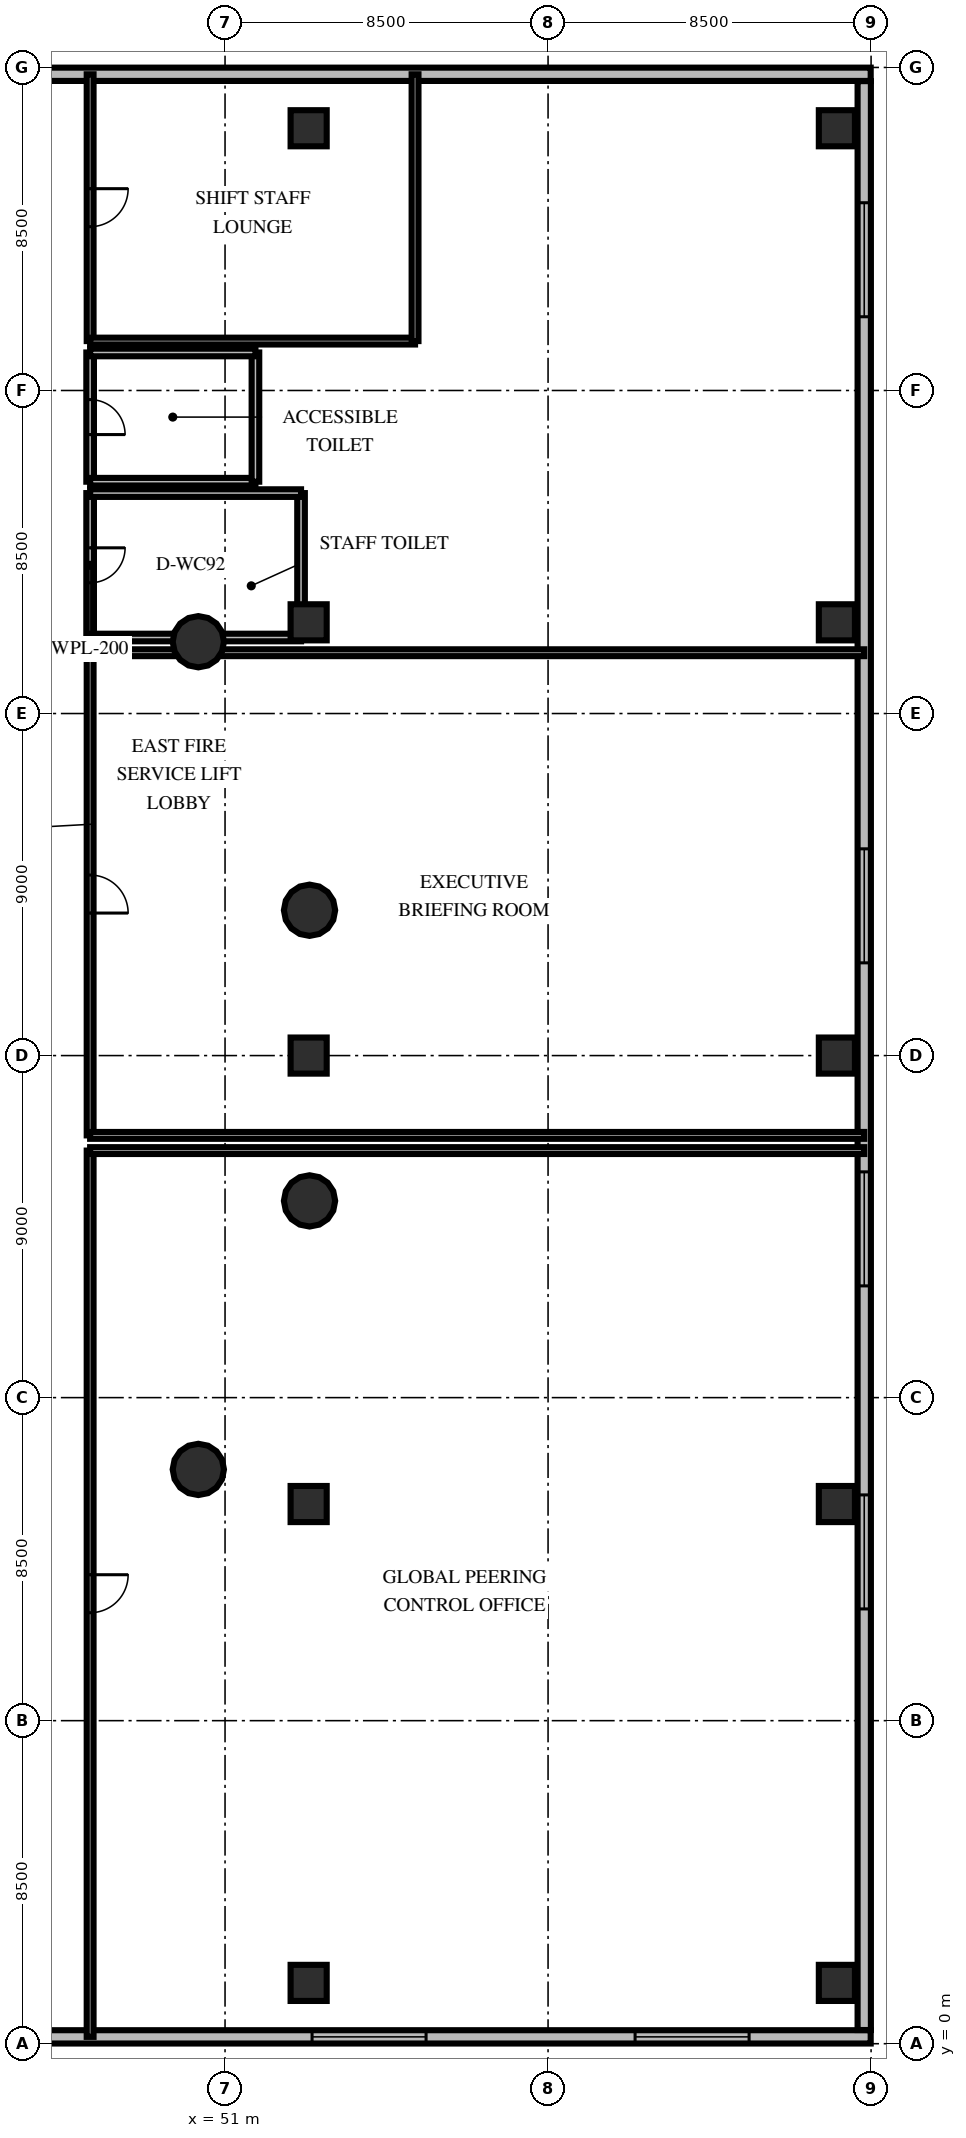
"""IFC4 building model, lengths in metres.
Left out: names, types, materials, properties, quantities, classifications, styles, units other than length and angle.
Written with IfcOpenShell. Run it as: python <this file> out.ifc"""

import sys

from ifc_helpers import new_model, si_unit, direction, frame, frame_2d, origin, origin_2d, place, context, subcontext, project, spatial, rectangle, circle, extrude, element, fill, save


model = new_model("IFC4")
c1 = context("Model", 3, precision=1e-05, world=origin(), true_north=direction((0.0, 1.0)))
c2 = subcontext(c1, "Body", "Model", "MODEL_VIEW")
j1 = project(units=[si_unit("LENGTHUNIT", "METRE"), si_unit("PLANEANGLEUNIT", "RADIAN")], contexts=[c1])
p1 = place(None, origin())
s1 = spatial("IfcSite", under=j1, at=p1, CompositionType="ELEMENT")
p2 = place(p1, origin())
s2 = spatial("IfcBuilding", under=s1, at=p2, CompositionType="ELEMENT")
p3 = place(p2, frame((0.0, 0.0, 10.2)))
s3 = spatial("IfcBuildingStorey", under=s2, at=p3, CompositionType="ELEMENT", Elevation=10.2)
for number, where, z_axis, x_axis in (
    (1, (53.2, 1.6, 0.0), (0.0, 0.0, 1.0), (1.0, 0.0, 0.0)),
    (2, (53.2, 14.2, 0.0), (0.0, 0.0, 1.0), (1.0, 0.0, 0.0)),
    (3, (53.2, 26.0, 0.0), (0.0, 0.0, 1.0), (1.0, 0.0, 0.0)),
    (4, (53.2, 37.4, 0.0), (0.0, 0.0, 1.0), (1.0, 0.0, 0.0)),
    (5, (53.2, 50.4, 0.0), (0.0, 0.0, 1.0), (1.0, 0.0, 0.0)),
    (6, (67.1, 1.6, 0.0), (0.0, 0.0, 1.0), (1.0, 0.0, 0.0)),
    (7, (67.1, 14.2, 0.0), (0.0, 0.0, 1.0), (1.0, 0.0, 0.0)),
    (8, (67.1, 26.0, 0.0), (0.0, 0.0, 1.0), (1.0, 0.0, 0.0)),
    (9, (67.1, 37.4, 0.0), (0.0, 0.0, 1.0), (1.0, 0.0, 0.0)),
    (10, (67.1, 50.4, 0.0), (0.0, 0.0, 1.0), (1.0, 0.0, 0.0)),
):
    element("IfcColumn", number, at=place(p3, frame(where, z_axis=z_axis, x_axis=x_axis)), inside=s3, PredefinedType="COLUMN", context=c2, shape_type="SweptSolid", body=[
        extrude(rectangle(XDim=0.95, YDim=0.95, at=origin_2d()), origin(), (0.0, 0.0, 1.0), 5.4),
    ])
for number, where, z_axis, x_axis in (
    (11, (53.223, 29.824, 0.0), (0.0, 0.0, 1.0), (1.0, 0.0, 0.0)),
    (12, (50.297, 36.889, 0.0), (0.0, 0.0, 1.0), (1.0, 0.0, 0.0)),
    (13, (50.297, 15.111, 0.0), (0.0, 0.0, 1.0), (1.0, 0.0, 0.0)),
    (14, (53.223, 22.176, 0.0), (0.0, 0.0, 1.0), (1.0, 0.0, 0.0)),
):
    element("IfcColumn", number, at=place(p3, frame(where, z_axis=z_axis, x_axis=x_axis)), inside=s3, PredefinedType="COLUMN", context=c2, shape_type="SweptSolid", body=[
        extrude(circle(Radius=0.675, at=origin_2d()), origin(), (0.0, 0.0, 1.0), 5.4),
    ])
p4 = place(p3, frame((67.99, 0.18, 0.0), z_axis=(0.0, 0.0, 1.0), x_axis=(-1.0, 0.0, 0.0)))
e15 = element("IfcWall", 15, at=p4, inside=s3, PredefinedType="SOLIDWALL", context=c2, shape_type="SweptSolid", body=[
    extrude(rectangle(XDim=25.37, YDim=0.35, at=frame_2d((12.685, 0.0))), origin(), (0.0, 0.0, 1.0), 4.36),
])
p5 = place(p4, frame((3.2, 0.0, 0.85)))
e16 = element("IfcOpeningElement", 16, at=p5, cuts=e15, PredefinedType="OPENING", context=c2, shape_type="SweptSolid", body=[
    extrude(rectangle(XDim=3.0, YDim=2.4, at=frame_2d((1.5, 1.2))), frame((0.0, 0.185, 0.0), z_axis=(0.0, -1.0, 0.0), x_axis=(1.0, 0.0, 0.0)), (0.0, 0.0, 1.0), 0.37),
])
p6 = place(p4, frame((11.7, 0.0, 0.85)))
e17 = element("IfcOpeningElement", 17, at=p6, cuts=e15, PredefinedType="OPENING", context=c2, shape_type="SweptSolid", body=[
    extrude(rectangle(XDim=3.0, YDim=2.4, at=frame_2d((1.5, 1.2))), frame((0.0, 0.185, 0.0), z_axis=(0.0, -1.0, 0.0), x_axis=(1.0, 0.0, 0.0)), (0.0, 0.0, 1.0), 0.37),
])
p7 = place(p3, frame((67.82, 51.64, 0.0), z_axis=(0.0, 0.0, 1.0), x_axis=(0.0, -1.0, 0.0)))
e18 = element("IfcWall", 18, at=p7, inside=s3, PredefinedType="SOLIDWALL", context=c2, shape_type="SweptSolid", body=[
    extrude(rectangle(XDim=51.28, YDim=0.35, at=frame_2d((25.64, 0.0))), origin(), (0.0, 0.0, 1.0), 4.36),
])
p8 = place(p7, frame((3.2, 0.0, 0.85)))
e19 = element("IfcOpeningElement", 19, at=p8, cuts=e18, PredefinedType="OPENING", context=c2, shape_type="SweptSolid", body=[
    extrude(rectangle(XDim=3.0, YDim=2.4, at=frame_2d((1.5, 1.2))), frame((0.0, 0.185, 0.0), z_axis=(0.0, -1.0, 0.0), x_axis=(1.0, 0.0, 0.0)), (0.0, 0.0, 1.0), 0.37),
])
p9 = place(p7, frame((20.2, 0.0, 0.85)))
e20 = element("IfcOpeningElement", 20, at=p9, cuts=e18, PredefinedType="OPENING", context=c2, shape_type="SweptSolid", body=[
    extrude(rectangle(XDim=3.0, YDim=2.4, at=frame_2d((1.5, 1.2))), frame((0.0, 0.185, 0.0), z_axis=(0.0, -1.0, 0.0), x_axis=(1.0, 0.0, 0.0)), (0.0, 0.0, 1.0), 0.37),
])
p10 = place(p7, frame((28.7, 0.0, 0.85)))
e21 = element("IfcOpeningElement", 21, at=p10, cuts=e18, PredefinedType="OPENING", context=c2, shape_type="SweptSolid", body=[
    extrude(rectangle(XDim=3.0, YDim=2.4, at=frame_2d((1.5, 1.2))), frame((0.0, 0.185, 0.0), z_axis=(0.0, -1.0, 0.0), x_axis=(1.0, 0.0, 0.0)), (0.0, 0.0, 1.0), 0.37),
])
p11 = place(p7, frame((37.2, 0.0, 0.85)))
e22 = element("IfcOpeningElement", 22, at=p11, cuts=e18, PredefinedType="OPENING", context=c2, shape_type="SweptSolid", body=[
    extrude(rectangle(XDim=3.0, YDim=2.4, at=frame_2d((1.5, 1.2))), frame((0.0, 0.185, 0.0), z_axis=(0.0, -1.0, 0.0), x_axis=(1.0, 0.0, 0.0)), (0.0, 0.0, 1.0), 0.37),
])
p12 = place(p3, frame((42.62, 51.82, 0.0), z_axis=(0.0, 0.0, 1.0), x_axis=(1.0, 0.0, 0.0)))
e23 = element("IfcWall", 23, at=p12, inside=s3, PredefinedType="SOLIDWALL", context=c2, shape_type="SweptSolid", body=[
    extrude(rectangle(XDim=25.37, YDim=0.35, at=frame_2d((12.685, 0.0))), origin(), (0.0, 0.0, 1.0), 4.36),
])
p13 = place(p3, frame((47.45, 23.5, 0.0), z_axis=(0.0, 0.0, 1.0), x_axis=(0.0, -1.0, 0.0)))
e24 = element("IfcWall", 24, at=p13, inside=s3, PredefinedType="PARTITIONING", context=c2, shape_type="SweptSolid", body=[
    extrude(rectangle(XDim=23.32, YDim=0.18, at=frame_2d((11.66, 0.0))), origin(), (0.0, 0.0, 1.0), 3.21),
])
p14 = place(p13, frame((11.16, 0.0, 0.0)))
e25 = element("IfcOpeningElement", 25, at=p14, cuts=e24, PredefinedType="OPENING", context=c2, shape_type="SweptSolid", body=[
    extrude(rectangle(XDim=1.0, YDim=2.15, at=frame_2d((0.5, 1.075))), frame((0.0, 0.1, 0.0), z_axis=(0.0, -1.0, 0.0), x_axis=(1.0, 0.0, 0.0)), (0.0, 0.0, 1.0), 0.2),
])
p15 = place(p3, frame((67.82, 23.5, 0.0), z_axis=(0.0, 0.0, 1.0), x_axis=(-1.0, 0.0, 0.0)))
e26 = element("IfcWall", 26, at=p15, inside=s3, PredefinedType="PARTITIONING", context=c2, shape_type="SweptSolid", body=[
    extrude(rectangle(XDim=20.37, YDim=0.18, at=frame_2d((10.185, 0.0))), origin(), (0.0, 0.0, 1.0), 3.21),
])
p16 = place(p3, frame((47.45, 36.6, 0.0), z_axis=(0.0, 0.0, 1.0), x_axis=(0.0, -1.0, 0.0)))
e27 = element("IfcWall", 27, at=p16, inside=s3, PredefinedType="PARTITIONING", context=c2, shape_type="SweptSolid", body=[
    extrude(rectangle(XDim=12.7, YDim=0.18, at=frame_2d((6.35, 0.0))), origin(), (0.0, 0.0, 1.0), 3.21),
])
p17 = place(p16, frame((5.85, 0.0, 0.0)))
e28 = element("IfcOpeningElement", 28, at=p17, cuts=e27, PredefinedType="OPENING", context=c2, shape_type="SweptSolid", body=[
    extrude(rectangle(XDim=1.0, YDim=2.15, at=frame_2d((0.5, 1.075))), frame((0.0, 0.1, 0.0), z_axis=(0.0, -1.0, 0.0), x_axis=(1.0, 0.0, 0.0)), (0.0, 0.0, 1.0), 0.2),
])
for number, where, z_axis, x_axis in (
    (29, (47.45, 23.9, 0.0), (0.0, 0.0, 1.0), (1.0, 0.0, 0.0)),
    (30, (67.82, 36.6, 0.0), (0.0, 0.0, 1.0), (-1.0, 0.0, 0.0)),
):
    element("IfcWall", number, at=place(p3, frame(where, z_axis=z_axis, x_axis=x_axis)), inside=s3, PredefinedType="PARTITIONING", context=c2, shape_type="SweptSolid", body=[
        extrude(rectangle(XDim=20.37, YDim=0.18, at=frame_2d((10.185, 0.0))), origin(), (0.0, 0.0, 1.0), 3.21),
    ])
p18 = place(p3, frame((47.45, 40.8, 0.0), z_axis=(0.0, 0.0, 1.0), x_axis=(0.0, -1.0, 0.0)))
e31 = element("IfcWall", 31, at=p18, inside=s3, PredefinedType="PLUMBINGWALL", context=c2, shape_type="SweptSolid", body=[
    extrude(rectangle(XDim=3.8, YDim=0.2, at=frame_2d((1.9, 0.0))), origin(), (0.0, 0.0, 1.0), 3.21),
])
p19 = place(p18, frame((1.44, 0.0, 0.0)))
e32 = element("IfcOpeningElement", 32, at=p19, cuts=e31, PredefinedType="OPENING", context=c2, shape_type="SweptSolid", body=[
    extrude(rectangle(XDim=0.92, YDim=2.1, at=frame_2d((0.46, 1.05))), frame((0.0, 0.11, 0.0), z_axis=(0.0, -1.0, 0.0), x_axis=(1.0, 0.0, 0.0)), (0.0, 0.0, 1.0), 0.22),
])
p20 = place(p3, frame((47.45, 37.0, 0.0), z_axis=(0.0, 0.0, 1.0), x_axis=(1.0, 0.0, 0.0)))
e33 = element("IfcWall", 33, at=p20, inside=s3, PredefinedType="PLUMBINGWALL", context=c2, shape_type="SweptSolid", body=[
    extrude(rectangle(XDim=5.55, YDim=0.2, at=frame_2d((2.775, 0.0))), origin(), (0.0, 0.0, 1.0), 3.21),
])
p21 = place(p3, frame((53.0, 37.0, 0.0), z_axis=(0.0, 0.0, 1.0), x_axis=(0.0, 1.0, 0.0)))
e34 = element("IfcWall", 34, at=p21, inside=s3, PredefinedType="PLUMBINGWALL", context=c2, shape_type="SweptSolid", body=[
    extrude(rectangle(XDim=3.8, YDim=0.2, at=frame_2d((1.9, 0.0))), origin(), (0.0, 0.0, 1.0), 3.21),
])
p22 = place(p3, frame((53.0, 40.8, 0.0), z_axis=(0.0, 0.0, 1.0), x_axis=(-1.0, 0.0, 0.0)))
e35 = element("IfcWall", 35, at=p22, inside=s3, PredefinedType="PLUMBINGWALL", context=c2, shape_type="SweptSolid", body=[
    extrude(rectangle(XDim=5.55, YDim=0.2, at=frame_2d((2.775, 0.0))), origin(), (0.0, 0.0, 1.0), 3.21),
])
p23 = place(p3, frame((47.45, 44.5, 0.0), z_axis=(0.0, 0.0, 1.0), x_axis=(0.0, -1.0, 0.0)))
e36 = element("IfcWall", 36, at=p23, inside=s3, PredefinedType="PLUMBINGWALL", context=c2, shape_type="SweptSolid", body=[
    extrude(rectangle(XDim=3.4, YDim=0.2, at=frame_2d((1.7, 0.0))), origin(), (0.0, 0.0, 1.0), 3.21),
])
p24 = place(p23, frame((1.24, 0.0, 0.0)))
e37 = element("IfcOpeningElement", 37, at=p24, cuts=e36, PredefinedType="OPENING", context=c2, shape_type="SweptSolid", body=[
    extrude(rectangle(XDim=0.92, YDim=2.1, at=frame_2d((0.46, 1.05))), frame((0.0, 0.11, 0.0), z_axis=(0.0, -1.0, 0.0), x_axis=(1.0, 0.0, 0.0)), (0.0, 0.0, 1.0), 0.22),
])
p25 = place(p3, frame((47.45, 41.1, 0.0), z_axis=(0.0, 0.0, 1.0), x_axis=(1.0, 0.0, 0.0)))
e38 = element("IfcWall", 38, at=p25, inside=s3, PredefinedType="PLUMBINGWALL", context=c2, shape_type="SweptSolid", body=[
    extrude(rectangle(XDim=4.35, YDim=0.2, at=frame_2d((2.175, 0.0))), origin(), (0.0, 0.0, 1.0), 3.21),
])
p26 = place(p3, frame((51.8, 41.1, 0.0), z_axis=(0.0, 0.0, 1.0), x_axis=(0.0, 1.0, 0.0)))
e39 = element("IfcWall", 39, at=p26, inside=s3, PredefinedType="PLUMBINGWALL", context=c2, shape_type="SweptSolid", body=[
    extrude(rectangle(XDim=3.4, YDim=0.2, at=frame_2d((1.7, 0.0))), origin(), (0.0, 0.0, 1.0), 3.21),
])
p27 = place(p3, frame((51.8, 44.5, 0.0), z_axis=(0.0, 0.0, 1.0), x_axis=(-1.0, 0.0, 0.0)))
e40 = element("IfcWall", 40, at=p27, inside=s3, PredefinedType="PLUMBINGWALL", context=c2, shape_type="SweptSolid", body=[
    extrude(rectangle(XDim=4.35, YDim=0.2, at=frame_2d((2.175, 0.0))), origin(), (0.0, 0.0, 1.0), 3.21),
])
p28 = place(p3, frame((47.45, 51.82, 0.0), z_axis=(0.0, 0.0, 1.0), x_axis=(0.0, -1.0, 0.0)))
e41 = element("IfcWall", 41, at=p28, inside=s3, PredefinedType="PARTITIONING", context=c2, shape_type="SweptSolid", body=[
    extrude(rectangle(XDim=7.02, YDim=0.18, at=frame_2d((3.51, 0.0))), origin(), (0.0, 0.0, 1.0), 3.21),
])
p29 = place(p28, frame((3.01, 0.0, 0.0)))
e42 = element("IfcOpeningElement", 42, at=p29, cuts=e41, PredefinedType="OPENING", context=c2, shape_type="SweptSolid", body=[
    extrude(rectangle(XDim=1.0, YDim=2.15, at=frame_2d((0.5, 1.075))), frame((0.0, 0.1, 0.0), z_axis=(0.0, -1.0, 0.0), x_axis=(1.0, 0.0, 0.0)), (0.0, 0.0, 1.0), 0.2),
])
p30 = place(p3, frame((47.45, 44.8, 0.0), z_axis=(0.0, 0.0, 1.0), x_axis=(1.0, 0.0, 0.0)))
e43 = element("IfcWall", 43, at=p30, inside=s3, PredefinedType="PARTITIONING", context=c2, shape_type="SweptSolid", body=[
    extrude(rectangle(XDim=8.55, YDim=0.18, at=frame_2d((4.275, 0.0))), origin(), (0.0, 0.0, 1.0), 3.21),
])
p31 = place(p3, frame((56.0, 44.8, 0.0), z_axis=(0.0, 0.0, 1.0), x_axis=(0.0, 1.0, 0.0)))
e44 = element("IfcWall", 44, at=p31, inside=s3, PredefinedType="PARTITIONING", context=c2, shape_type="SweptSolid", body=[
    extrude(rectangle(XDim=7.02, YDim=0.18, at=frame_2d((3.51, 0.0))), origin(), (0.0, 0.0, 1.0), 3.21),
])
p32 = place(p5, origin())
e45 = element("IfcWindow", 45, at=p32, inside=s3, PartitioningType="SINGLE_PANEL", PredefinedType="WINDOW", context=c2, shape_type="SweptSolid", body=[
    extrude(rectangle(XDim=3.0, YDim=2.4, at=frame_2d((1.5, 1.2))), frame((0.0, 0.03, 0.0), z_axis=(0.0, -1.0, 0.0), x_axis=(1.0, 0.0, 0.0)), (0.0, 0.0, 1.0), 0.06),
])
fill(e16, e45)
p33 = place(p6, origin())
e46 = element("IfcWindow", 46, at=p33, inside=s3, PartitioningType="SINGLE_PANEL", PredefinedType="WINDOW", context=c2, shape_type="SweptSolid", body=[
    extrude(rectangle(XDim=3.0, YDim=2.4, at=frame_2d((1.5, 1.2))), frame((0.0, 0.03, 0.0), z_axis=(0.0, -1.0, 0.0), x_axis=(1.0, 0.0, 0.0)), (0.0, 0.0, 1.0), 0.06),
])
fill(e17, e46)
p34 = place(p8, origin())
e47 = element("IfcWindow", 47, at=p34, inside=s3, PartitioningType="SINGLE_PANEL", PredefinedType="WINDOW", context=c2, shape_type="SweptSolid", body=[
    extrude(rectangle(XDim=3.0, YDim=2.4, at=frame_2d((1.5, 1.2))), frame((0.0, 0.03, 0.0), z_axis=(0.0, -1.0, 0.0), x_axis=(1.0, 0.0, 0.0)), (0.0, 0.0, 1.0), 0.06),
])
fill(e19, e47)
p35 = place(p9, origin())
e48 = element("IfcWindow", 48, at=p35, inside=s3, PartitioningType="SINGLE_PANEL", PredefinedType="WINDOW", context=c2, shape_type="SweptSolid", body=[
    extrude(rectangle(XDim=3.0, YDim=2.4, at=frame_2d((1.5, 1.2))), frame((0.0, 0.03, 0.0), z_axis=(0.0, -1.0, 0.0), x_axis=(1.0, 0.0, 0.0)), (0.0, 0.0, 1.0), 0.06),
])
fill(e20, e48)
p36 = place(p10, origin())
e49 = element("IfcWindow", 49, at=p36, inside=s3, PartitioningType="SINGLE_PANEL", PredefinedType="WINDOW", context=c2, shape_type="SweptSolid", body=[
    extrude(rectangle(XDim=3.0, YDim=2.4, at=frame_2d((1.5, 1.2))), frame((0.0, 0.03, 0.0), z_axis=(0.0, -1.0, 0.0), x_axis=(1.0, 0.0, 0.0)), (0.0, 0.0, 1.0), 0.06),
])
fill(e21, e49)
p37 = place(p11, origin())
e50 = element("IfcWindow", 50, at=p37, inside=s3, PartitioningType="SINGLE_PANEL", PredefinedType="WINDOW", context=c2, shape_type="SweptSolid", body=[
    extrude(rectangle(XDim=3.0, YDim=2.4, at=frame_2d((1.5, 1.2))), frame((0.0, 0.03, 0.0), z_axis=(0.0, -1.0, 0.0), x_axis=(1.0, 0.0, 0.0)), (0.0, 0.0, 1.0), 0.06),
])
fill(e22, e50)
p38 = place(p14, origin())
e51 = element("IfcDoor", 51, at=p38, inside=s3, OperationType="SINGLE_SWING_LEFT", PredefinedType="DOOR", context=c2, shape_type="SweptSolid", body=[
    extrude(rectangle(XDim=1.0, YDim=2.15, at=frame_2d((0.5, 1.075))), frame((0.0, 0.025, 0.0), z_axis=(0.0, -1.0, 0.0), x_axis=(1.0, 0.0, 0.0)), (0.0, 0.0, 1.0), 0.05),
])
fill(e25, e51)
p39 = place(p17, origin())
e52 = element("IfcDoor", 52, at=p39, inside=s3, OperationType="SINGLE_SWING_RIGHT", PredefinedType="DOOR", context=c2, shape_type="SweptSolid", body=[
    extrude(rectangle(XDim=1.0, YDim=2.15, at=frame_2d((0.5, 1.075))), frame((0.0, 0.025, 0.0), z_axis=(0.0, -1.0, 0.0), x_axis=(1.0, 0.0, 0.0)), (0.0, 0.0, 1.0), 0.05),
])
fill(e28, e52)
p40 = place(p19, origin())
e53 = element("IfcDoor", 53, at=p40, inside=s3, OperationType="SINGLE_SWING_LEFT", PredefinedType="DOOR", context=c2, shape_type="SweptSolid", body=[
    extrude(rectangle(XDim=0.92, YDim=2.1, at=frame_2d((0.46, 1.05))), frame((0.0, 0.025, 0.0), z_axis=(0.0, -1.0, 0.0), x_axis=(1.0, 0.0, 0.0)), (0.0, 0.0, 1.0), 0.05),
])
fill(e32, e53)
p41 = place(p24, origin())
e54 = element("IfcDoor", 54, at=p41, inside=s3, OperationType="SINGLE_SWING_RIGHT", PredefinedType="DOOR", context=c2, shape_type="SweptSolid", body=[
    extrude(rectangle(XDim=0.92, YDim=2.1, at=frame_2d((0.46, 1.05))), frame((0.0, 0.025, 0.0), z_axis=(0.0, -1.0, 0.0), x_axis=(1.0, 0.0, 0.0)), (0.0, 0.0, 1.0), 0.05),
])
fill(e37, e54)
p42 = place(p29, origin())
e55 = element("IfcDoor", 55, at=p42, inside=s3, OperationType="SINGLE_SWING_LEFT", PredefinedType="DOOR", context=c2, shape_type="SweptSolid", body=[
    extrude(rectangle(XDim=1.0, YDim=2.15, at=frame_2d((0.5, 1.075))), frame((0.0, 0.025, 0.0), z_axis=(0.0, -1.0, 0.0), x_axis=(1.0, 0.0, 0.0)), (0.0, 0.0, 1.0), 0.05),
])
fill(e42, e55)
save(model, sys.argv[1])
